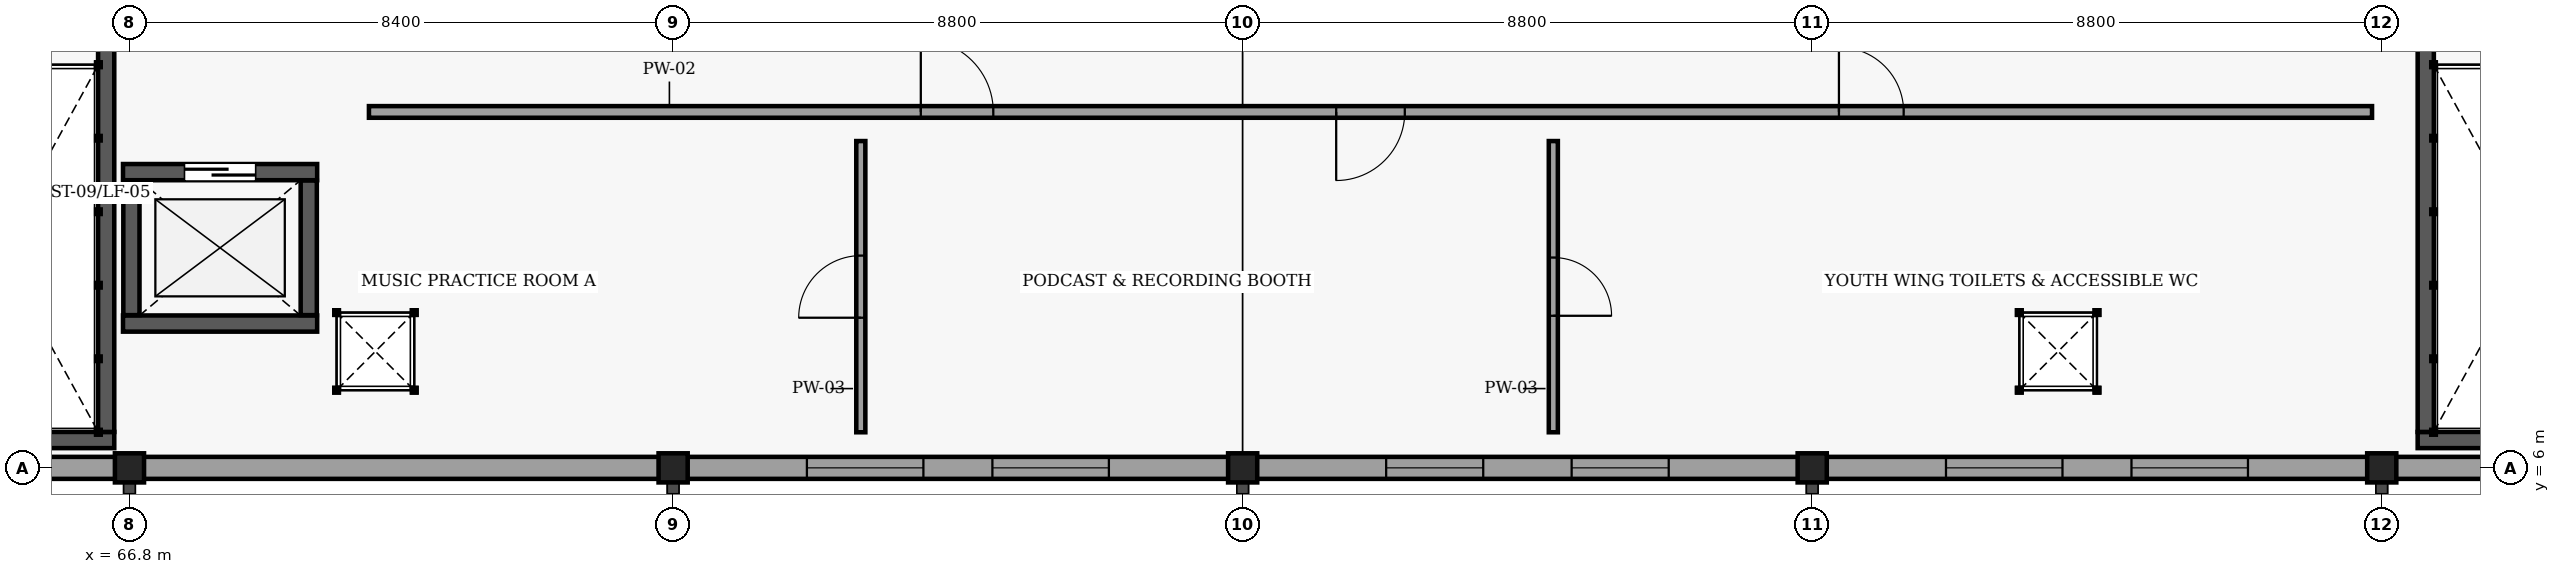
"""IFC4 building model, lengths in metres.
Left out: names, types, materials, properties, quantities, classifications, styles, units other than length and angle.
Written with IfcOpenShell. Run it as: python <this file> out.ifc"""

import sys

from ifc_helpers import new_model, si_unit, direction, frame, frame_2d, origin, origin_2d, place, context, subcontext, project, spatial, rectangle, extrude, element, fill, save


model = new_model("IFC4")
c1 = context("Model", 3, precision=1e-05, world=origin(), true_north=direction((0.0, 1.0)))
c2 = subcontext(c1, "Body", "Model", "MODEL_VIEW")
j1 = project(units=[si_unit("LENGTHUNIT", "METRE"), si_unit("PLANEANGLEUNIT", "RADIAN")], contexts=[c1])
p1 = place(None, origin())
s1 = spatial("IfcSite", under=j1, at=p1, CompositionType="ELEMENT")
p2 = place(p1, origin())
s2 = spatial("IfcBuilding", under=s1, at=p2, CompositionType="ELEMENT")
p3 = place(p2, frame((0.0, 0.0, 9.0)))
s3 = spatial("IfcBuildingStorey", under=s2, at=p3, CompositionType="ELEMENT", Elevation=9.0)
for number, where, z_axis, x_axis in (
    (1, (66.8, 6.0, 0.0), (0.0, 0.0, 1.0), (1.0, 0.0, 0.0)),
    (2, (75.2, 6.0, 0.0), (0.0, 0.0, 1.0), (1.0, 0.0, 0.0)),
    (3, (84.0, 6.0, 0.0), (0.0, 0.0, 1.0), (1.0, 0.0, 0.0)),
    (4, (92.8, 6.0, 0.0), (0.0, 0.0, 1.0), (1.0, 0.0, 0.0)),
    (5, (101.6, 6.0, 0.0), (0.0, 0.0, 1.0), (1.0, 0.0, 0.0)),
):
    element("IfcColumn", number, at=place(p3, frame(where, z_axis=z_axis, x_axis=x_axis)), inside=s3, PredefinedType="COLUMN", context=c2, shape_type="SweptSolid", body=[
        extrude(rectangle(XDim=0.45, YDim=0.45, at=origin_2d()), origin(), (0.0, 0.0, 1.0), 3.9),
    ])
p4 = place(p3, frame((58.5, 6.0, 0.0), z_axis=(0.0, 0.0, 1.0), x_axis=(1.0, 0.0, 0.0)))
e6 = element("IfcWall", 6, at=p4, inside=s3, PredefinedType="SOLIDWALL", context=c2, shape_type="SweptSolid", body=[
    extrude(rectangle(XDim=8.2, YDim=0.34, at=frame_2d((4.1, 0.0))), origin(), (0.0, 0.0, 1.0), 3.346),
])
p5 = place(p3, frame((66.9, 6.0, 0.0), z_axis=(0.0, 0.0, 1.0), x_axis=(1.0, 0.0, 0.0)))
e7 = element("IfcWall", 7, at=p5, inside=s3, PredefinedType="SOLIDWALL", context=c2, shape_type="SweptSolid", body=[
    extrude(rectangle(XDim=8.2, YDim=0.34, at=frame_2d((4.1, 0.0))), origin(), (0.0, 0.0, 1.0), 3.346),
])
p6 = place(p3, frame((75.3, 6.0, 0.0), z_axis=(0.0, 0.0, 1.0), x_axis=(1.0, 0.0, 0.0)))
e8 = element("IfcWall", 8, at=p6, inside=s3, PredefinedType="SOLIDWALL", context=c2, shape_type="SweptSolid", body=[
    extrude(rectangle(XDim=8.6, YDim=0.34, at=frame_2d((4.3, 0.0))), origin(), (0.0, 0.0, 1.0), 3.346),
])
p7 = place(p6, frame((1.967, 0.0, 1.1)))
e9 = element("IfcOpeningElement", 9, at=p7, cuts=e8, PredefinedType="OPENING", context=c2, shape_type="SweptSolid", body=[
    extrude(rectangle(XDim=1.8, YDim=1.5, at=frame_2d((0.9, 0.75))), frame((0.0, 0.18, 0.0), z_axis=(0.0, -1.0, 0.0), x_axis=(1.0, 0.0, 0.0)), (0.0, 0.0, 1.0), 0.36),
])
p8 = place(p6, frame((4.833, 0.0, 1.1)))
e10 = element("IfcOpeningElement", 10, at=p8, cuts=e8, PredefinedType="OPENING", context=c2, shape_type="SweptSolid", body=[
    extrude(rectangle(XDim=1.8, YDim=1.5, at=frame_2d((0.9, 0.75))), frame((0.0, 0.18, 0.0), z_axis=(0.0, -1.0, 0.0), x_axis=(1.0, 0.0, 0.0)), (0.0, 0.0, 1.0), 0.36),
])
p9 = place(p3, frame((84.1, 6.0, 0.0), z_axis=(0.0, 0.0, 1.0), x_axis=(1.0, 0.0, 0.0)))
e11 = element("IfcWall", 11, at=p9, inside=s3, PredefinedType="SOLIDWALL", context=c2, shape_type="SweptSolid", body=[
    extrude(rectangle(XDim=8.6, YDim=0.34, at=frame_2d((4.3, 0.0))), origin(), (0.0, 0.0, 1.0), 3.346),
])
p10 = place(p9, frame((2.117, 0.0, 1.1)))
e12 = element("IfcOpeningElement", 12, at=p10, cuts=e11, PredefinedType="OPENING", context=c2, shape_type="SweptSolid", body=[
    extrude(rectangle(XDim=1.5, YDim=1.8, at=frame_2d((0.75, 0.9))), frame((0.0, 0.18, 0.0), z_axis=(0.0, -1.0, 0.0), x_axis=(1.0, 0.0, 0.0)), (0.0, 0.0, 1.0), 0.36),
])
p11 = place(p9, frame((4.983, 0.0, 1.1)))
e13 = element("IfcOpeningElement", 13, at=p11, cuts=e11, PredefinedType="OPENING", context=c2, shape_type="SweptSolid", body=[
    extrude(rectangle(XDim=1.5, YDim=1.8, at=frame_2d((0.75, 0.9))), frame((0.0, 0.18, 0.0), z_axis=(0.0, -1.0, 0.0), x_axis=(1.0, 0.0, 0.0)), (0.0, 0.0, 1.0), 0.36),
])
p12 = place(p3, frame((92.9, 6.0, 0.0), z_axis=(0.0, 0.0, 1.0), x_axis=(1.0, 0.0, 0.0)))
e14 = element("IfcWall", 14, at=p12, inside=s3, PredefinedType="SOLIDWALL", context=c2, shape_type="SweptSolid", body=[
    extrude(rectangle(XDim=8.6, YDim=0.34, at=frame_2d((4.3, 0.0))), origin(), (0.0, 0.0, 1.0), 3.346),
])
p13 = place(p12, frame((1.967, 0.0, 1.1)))
e15 = element("IfcOpeningElement", 15, at=p13, cuts=e14, PredefinedType="OPENING", context=c2, shape_type="SweptSolid", body=[
    extrude(rectangle(XDim=1.8, YDim=1.8, at=frame_2d((0.9, 0.9))), frame((0.0, 0.18, 0.0), z_axis=(0.0, -1.0, 0.0), x_axis=(1.0, 0.0, 0.0)), (0.0, 0.0, 1.0), 0.36),
])
p14 = place(p12, frame((4.833, 0.0, 1.1)))
e16 = element("IfcOpeningElement", 16, at=p14, cuts=e14, PredefinedType="OPENING", context=c2, shape_type="SweptSolid", body=[
    extrude(rectangle(XDim=1.8, YDim=1.8, at=frame_2d((0.9, 0.9))), frame((0.0, 0.18, 0.0), z_axis=(0.0, -1.0, 0.0), x_axis=(1.0, 0.0, 0.0)), (0.0, 0.0, 1.0), 0.36),
])
p15 = place(p3, frame((101.7, 6.0, 0.0), z_axis=(0.0, 0.0, 1.0), x_axis=(1.0, 0.0, 0.0)))
e17 = element("IfcWall", 17, at=p15, inside=s3, PredefinedType="SOLIDWALL", context=c2, shape_type="SweptSolid", body=[
    extrude(rectangle(XDim=8.6, YDim=0.34, at=frame_2d((4.3, 0.0))), origin(), (0.0, 0.0, 1.0), 3.346),
])
p16 = place(p3, frame((66.565, 6.43, 0.0), z_axis=(0.0, 0.0, 1.0), x_axis=(-1.0, 0.0, 0.0)))
e18 = element("IfcWall", 18, at=p16, inside=s3, PredefinedType="SHEAR", context=c2, shape_type="SweptSolid", body=[
    extrude(rectangle(XDim=3.61, YDim=0.25, at=frame_2d((1.805, 0.0))), origin(), (0.0, 0.0, 1.0), 3.66),
])
p17 = place(p3, frame((66.44, 13.945, 0.0), z_axis=(0.0, 0.0, 1.0), x_axis=(0.0, -1.0, 0.0)))
e19 = element("IfcWall", 19, at=p17, inside=s3, PredefinedType="SHEAR", context=c2, shape_type="SweptSolid", body=[
    extrude(rectangle(XDim=7.39, YDim=0.25, at=frame_2d((3.695, 0.0))), origin(), (0.0, 0.0, 1.0), 3.66),
])
p18 = place(p3, frame((66.7, 8.23, 0.0), z_axis=(0.0, 0.0, 1.0), x_axis=(1.0, 0.0, 0.0)))
e20 = element("IfcWall", 20, at=p18, inside=s3, PredefinedType="SHEAR", context=c2, shape_type="SweptSolid", body=[
    extrude(rectangle(XDim=3.0, YDim=0.25, at=frame_2d((1.5, 0.0))), origin(), (0.0, 0.0, 1.0), 3.66),
])
p19 = place(p3, frame((69.7, 10.57, 0.0), z_axis=(0.0, 0.0, 1.0), x_axis=(-1.0, 0.0, 0.0)))
e21 = element("IfcWall", 21, at=p19, inside=s3, PredefinedType="SHEAR", context=c2, shape_type="SweptSolid", body=[
    extrude(rectangle(XDim=3.0, YDim=0.25, at=frame_2d((1.5, 0.0))), origin(), (0.0, 0.0, 1.0), 3.66),
])
p20 = place(p19, frame((0.95, 0.0, 0.0)))
e22 = element("IfcOpeningElement", 22, at=p20, cuts=e21, PredefinedType="OPENING", context=c2, shape_type="SweptSolid", body=[
    extrude(rectangle(XDim=1.1, YDim=2.15, at=frame_2d((0.55, 1.075))), frame((0.0, 0.135, 0.0), z_axis=(0.0, -1.0, 0.0), x_axis=(1.0, 0.0, 0.0)), (0.0, 0.0, 1.0), 0.27),
])
for number, where, z_axis, x_axis in (
    (23, (69.57, 8.36, 0.0), (0.0, 0.0, 1.0), (0.0, 1.0, 0.0)),
    (24, (66.83, 10.44, 0.0), (0.0, 0.0, 1.0), (0.0, -1.0, 0.0)),
):
    element("IfcWall", number, at=place(p3, frame(where, z_axis=z_axis, x_axis=x_axis)), inside=s3, PredefinedType="SHEAR", context=c2, shape_type="SweptSolid", body=[
        extrude(rectangle(XDim=2.08, YDim=0.25, at=frame_2d((1.04, 0.0))), origin(), (0.0, 0.0, 1.0), 3.66),
    ])
p21 = place(p3, frame((105.765, 6.43, 0.0), z_axis=(0.0, 0.0, 1.0), x_axis=(-1.0, 0.0, 0.0)))
e25 = element("IfcWall", 25, at=p21, inside=s3, PredefinedType="SHEAR", context=c2, shape_type="SweptSolid", body=[
    extrude(rectangle(XDim=3.61, YDim=0.25, at=frame_2d((1.805, 0.0))), origin(), (0.0, 0.0, 1.0), 3.66),
])
p22 = place(p3, frame((102.28, 6.555, 0.0), z_axis=(0.0, 0.0, 1.0), x_axis=(0.0, 1.0, 0.0)))
e26 = element("IfcWall", 26, at=p22, inside=s3, PredefinedType="SHEAR", context=c2, shape_type="SweptSolid", body=[
    extrude(rectangle(XDim=7.39, YDim=0.25, at=frame_2d((3.695, 0.0))), origin(), (0.0, 0.0, 1.0), 3.66),
])
p23 = place(p3, frame((70.5, 11.5, 0.0), z_axis=(0.0, 0.0, 1.0), x_axis=(1.0, 0.0, 0.0)))
e27 = element("IfcWall", 27, at=p23, inside=s3, PredefinedType="PARTITIONING", context=c2, shape_type="SweptSolid", body=[
    extrude(rectangle(XDim=30.95, YDim=0.18, at=frame_2d((15.475, 0.0))), origin(), (0.0, 0.0, 1.0), 3.425),
])
p24 = place(p23, frame((8.527, 0.0, 0.0)))
e28 = element("IfcOpeningElement", 28, at=p24, cuts=e27, PredefinedType="OPENING", context=c2, shape_type="SweptSolid", body=[
    extrude(rectangle(XDim=1.12, YDim=2.16, at=frame_2d((0.56, 1.08))), frame((0.0, 0.1, 0.0), z_axis=(0.0, -1.0, 0.0), x_axis=(1.0, 0.0, 0.0)), (0.0, 0.0, 1.0), 0.2),
])
p25 = place(p23, frame((14.945, 0.0, 0.0)))
e29 = element("IfcOpeningElement", 29, at=p25, cuts=e27, PredefinedType="OPENING", context=c2, shape_type="SweptSolid", body=[
    extrude(rectangle(XDim=1.06, YDim=2.16, at=frame_2d((0.53, 1.08))), frame((0.0, 0.1, 0.0), z_axis=(0.0, -1.0, 0.0), x_axis=(1.0, 0.0, 0.0)), (0.0, 0.0, 1.0), 0.2),
])
p26 = place(p23, frame((22.713, 0.0, 0.0)))
e30 = element("IfcOpeningElement", 30, at=p26, cuts=e27, PredefinedType="OPENING", context=c2, shape_type="SweptSolid", body=[
    extrude(rectangle(XDim=1.0, YDim=2.14, at=frame_2d((0.5, 1.07))), frame((0.0, 0.1, 0.0), z_axis=(0.0, -1.0, 0.0), x_axis=(1.0, 0.0, 0.0)), (0.0, 0.0, 1.0), 0.2),
])
p27 = place(p3, frame((78.1, 6.55, 0.0), z_axis=(0.0, 0.0, 1.0), x_axis=(0.0, 1.0, 0.0)))
e31 = element("IfcWall", 31, at=p27, inside=s3, PredefinedType="PARTITIONING", context=c2, shape_type="SweptSolid", body=[
    extrude(rectangle(XDim=4.5, YDim=0.14, at=frame_2d((2.25, 0.0))), origin(), (0.0, 0.0, 1.0), 3.527),
])
p28 = place(p27, frame((1.77, 0.0, 0.0)))
e32 = element("IfcOpeningElement", 32, at=p28, cuts=e31, PredefinedType="OPENING", context=c2, shape_type="SweptSolid", body=[
    extrude(rectangle(XDim=0.96, YDim=2.08, at=frame_2d((0.48, 1.04))), frame((0.0, 0.08, 0.0), z_axis=(0.0, -1.0, 0.0), x_axis=(1.0, 0.0, 0.0)), (0.0, 0.0, 1.0), 0.16),
])
p29 = place(p3, frame((88.8, 6.55, 0.0), z_axis=(0.0, 0.0, 1.0), x_axis=(0.0, 1.0, 0.0)))
e33 = element("IfcWall", 33, at=p29, inside=s3, PredefinedType="PARTITIONING", context=c2, shape_type="SweptSolid", body=[
    extrude(rectangle(XDim=4.5, YDim=0.14, at=frame_2d((2.25, 0.0))), origin(), (0.0, 0.0, 1.0), 3.645),
])
p30 = place(p29, frame((1.8, 0.0, 0.0)))
e34 = element("IfcOpeningElement", 34, at=p30, cuts=e33, PredefinedType="OPENING", context=c2, shape_type="SweptSolid", body=[
    extrude(rectangle(XDim=0.9, YDim=2.06, at=frame_2d((0.45, 1.03))), frame((0.0, 0.08, 0.0), z_axis=(0.0, -1.0, 0.0), x_axis=(1.0, 0.0, 0.0)), (0.0, 0.0, 1.0), 0.16),
])
p31 = place(p7, origin())
e35 = element("IfcWindow", 35, at=p31, inside=s3, PartitioningType="SINGLE_PANEL", PredefinedType="WINDOW", context=c2, shape_type="SweptSolid", body=[
    extrude(rectangle(XDim=1.8, YDim=1.5, at=frame_2d((0.9, 0.75))), frame((0.0, 0.03, 0.0), z_axis=(0.0, -1.0, 0.0), x_axis=(1.0, 0.0, 0.0)), (0.0, 0.0, 1.0), 0.06),
])
fill(e9, e35)
p32 = place(p8, origin())
e36 = element("IfcWindow", 36, at=p32, inside=s3, PartitioningType="SINGLE_PANEL", PredefinedType="WINDOW", context=c2, shape_type="SweptSolid", body=[
    extrude(rectangle(XDim=1.8, YDim=1.5, at=frame_2d((0.9, 0.75))), frame((0.0, 0.03, 0.0), z_axis=(0.0, -1.0, 0.0), x_axis=(1.0, 0.0, 0.0)), (0.0, 0.0, 1.0), 0.06),
])
fill(e10, e36)
p33 = place(p10, origin())
e37 = element("IfcWindow", 37, at=p33, inside=s3, PartitioningType="SINGLE_PANEL", PredefinedType="WINDOW", context=c2, shape_type="SweptSolid", body=[
    extrude(rectangle(XDim=1.5, YDim=1.8, at=frame_2d((0.75, 0.9))), frame((0.0, 0.03, 0.0), z_axis=(0.0, -1.0, 0.0), x_axis=(1.0, 0.0, 0.0)), (0.0, 0.0, 1.0), 0.06),
])
fill(e12, e37)
p34 = place(p11, origin())
e38 = element("IfcWindow", 38, at=p34, inside=s3, PartitioningType="SINGLE_PANEL", PredefinedType="WINDOW", context=c2, shape_type="SweptSolid", body=[
    extrude(rectangle(XDim=1.5, YDim=1.8, at=frame_2d((0.75, 0.9))), frame((0.0, 0.03, 0.0), z_axis=(0.0, -1.0, 0.0), x_axis=(1.0, 0.0, 0.0)), (0.0, 0.0, 1.0), 0.06),
])
fill(e13, e38)
p35 = place(p13, origin())
e39 = element("IfcWindow", 39, at=p35, inside=s3, PartitioningType="SINGLE_PANEL", PredefinedType="WINDOW", context=c2, shape_type="SweptSolid", body=[
    extrude(rectangle(XDim=1.8, YDim=1.8, at=frame_2d((0.9, 0.9))), frame((0.0, 0.03, 0.0), z_axis=(0.0, -1.0, 0.0), x_axis=(1.0, 0.0, 0.0)), (0.0, 0.0, 1.0), 0.06),
])
fill(e15, e39)
p36 = place(p14, origin())
e40 = element("IfcWindow", 40, at=p36, inside=s3, PartitioningType="SINGLE_PANEL", PredefinedType="WINDOW", context=c2, shape_type="SweptSolid", body=[
    extrude(rectangle(XDim=1.8, YDim=1.8, at=frame_2d((0.9, 0.9))), frame((0.0, 0.03, 0.0), z_axis=(0.0, -1.0, 0.0), x_axis=(1.0, 0.0, 0.0)), (0.0, 0.0, 1.0), 0.06),
])
fill(e16, e40)
p37 = place(p20, origin())
e41 = element("IfcDoor", 41, at=p37, inside=s3, OperationType="SLIDING_TO_LEFT", PredefinedType="DOOR", context=c2, shape_type="SweptSolid", body=[
    extrude(rectangle(XDim=1.1, YDim=2.15, at=frame_2d((0.55, 1.075))), frame((0.0, 0.025, 0.0), z_axis=(0.0, -1.0, 0.0), x_axis=(1.0, 0.0, 0.0)), (0.0, 0.0, 1.0), 0.05),
])
fill(e22, e41)
p38 = place(p24, origin())
e42 = element("IfcDoor", 42, at=p38, inside=s3, OperationType="SINGLE_SWING_LEFT", PredefinedType="DOOR", context=c2, shape_type="SweptSolid", body=[
    extrude(rectangle(XDim=1.12, YDim=2.16, at=frame_2d((0.56, 1.08))), frame((0.0, 0.025, 0.0), z_axis=(0.0, -1.0, 0.0), x_axis=(1.0, 0.0, 0.0)), (0.0, 0.0, 1.0), 0.05),
])
fill(e28, e42)
p39 = place(p25, origin())
e43 = element("IfcDoor", 43, at=p39, inside=s3, OperationType="SINGLE_SWING_RIGHT", PredefinedType="DOOR", context=c2, shape_type="SweptSolid", body=[
    extrude(rectangle(XDim=1.06, YDim=2.16, at=frame_2d((0.53, 1.08))), frame((0.0, 0.025, 0.0), z_axis=(0.0, -1.0, 0.0), x_axis=(1.0, 0.0, 0.0)), (0.0, 0.0, 1.0), 0.05),
])
fill(e29, e43)
p40 = place(p26, origin())
e44 = element("IfcDoor", 44, at=p40, inside=s3, OperationType="SINGLE_SWING_LEFT", PredefinedType="DOOR", context=c2, shape_type="SweptSolid", body=[
    extrude(rectangle(XDim=1.0, YDim=2.14, at=frame_2d((0.5, 1.07))), frame((0.0, 0.025, 0.0), z_axis=(0.0, -1.0, 0.0), x_axis=(1.0, 0.0, 0.0)), (0.0, 0.0, 1.0), 0.05),
])
fill(e30, e44)
p41 = place(p28, origin())
e45 = element("IfcDoor", 45, at=p41, inside=s3, OperationType="SINGLE_SWING_LEFT", PredefinedType="DOOR", context=c2, shape_type="SweptSolid", body=[
    extrude(rectangle(XDim=0.96, YDim=2.08, at=frame_2d((0.48, 1.04))), frame((0.0, 0.025, 0.0), z_axis=(0.0, -1.0, 0.0), x_axis=(1.0, 0.0, 0.0)), (0.0, 0.0, 1.0), 0.05),
])
fill(e32, e45)
p42 = place(p30, origin())
e46 = element("IfcDoor", 46, at=p42, inside=s3, OperationType="SINGLE_SWING_RIGHT", PredefinedType="DOOR", context=c2, shape_type="SweptSolid", body=[
    extrude(rectangle(XDim=0.9, YDim=2.06, at=frame_2d((0.45, 1.03))), frame((0.0, 0.025, 0.0), z_axis=(0.0, -1.0, 0.0), x_axis=(1.0, 0.0, 0.0)), (0.0, 0.0, 1.0), 0.05),
])
fill(e34, e46)
save(model, sys.argv[1])
